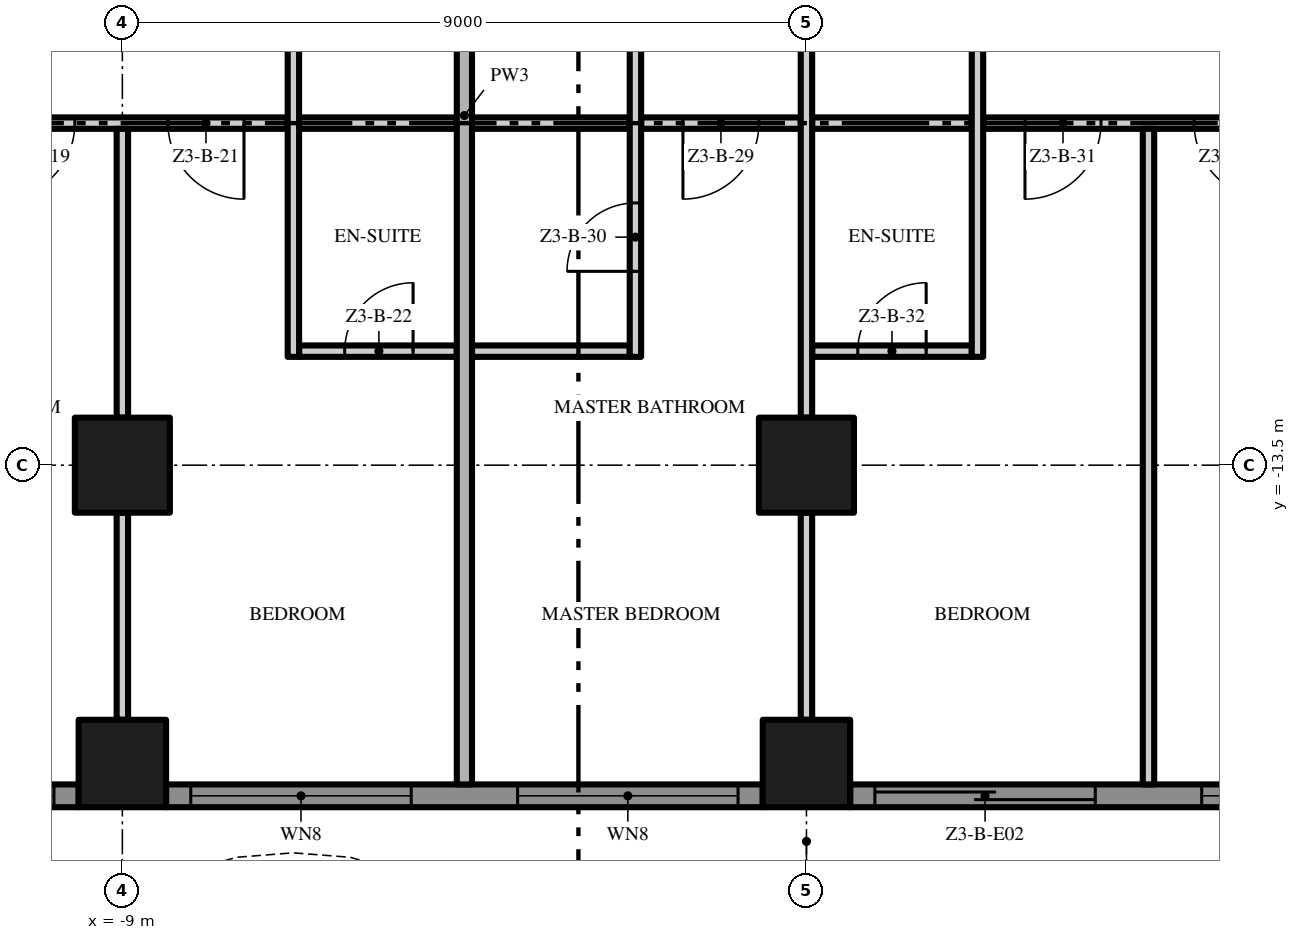
"""IFC4 building model, lengths in metres.
Left out: names, types, materials, properties, quantities, classifications, styles, units other than length and angle.
Written with IfcOpenShell. Run it as: python <this file> out.ifc"""

import sys

from ifc_helpers import new_model, si_unit, direction, frame, frame_2d, origin, origin_2d, place, context, subcontext, project, spatial, polyline, rectangle, outline, extrude, element, fill, save


model = new_model("IFC4")
c1 = context("Model", 3, precision=1e-05, world=origin(), true_north=direction((0.0, 1.0)))
c2 = subcontext(c1, "Body", "Model", "MODEL_VIEW")
j1 = project(units=[si_unit("LENGTHUNIT", "METRE"), si_unit("PLANEANGLEUNIT", "RADIAN")], contexts=[c1])
p1 = place(None, origin())
s1 = spatial("IfcSite", under=j1, at=p1, CompositionType="ELEMENT")
p2 = place(p1, origin())
s2 = spatial("IfcBuilding", under=s1, at=p2, CompositionType="ELEMENT")
p3 = place(p2, frame((0.0, 0.0, 144.0)))
s3 = spatial("IfcBuildingStorey", under=s2, at=p3, CompositionType="ELEMENT", Elevation=144.0)
p4 = place(p3, frame((-9.0, -13.5, 0.0), z_axis=(0.0, 0.0, 1.0), x_axis=(1.0, 0.0, 0.0)))
e1 = element("IfcColumn", 1, at=p4, inside=s3, PredefinedType="COLUMN", context=c2, shape_type="SweptSolid", body=[
    extrude(rectangle(XDim=1.25, YDim=1.25, at=origin_2d()), origin(), (0.0, 0.0, 1.0), 3.5),
])
p5 = place(p3, frame((-9.0, -17.425, 0.0), z_axis=(0.0, 0.0, 1.0), x_axis=(1.0, 0.0, 0.0)))
e2 = element("IfcColumn", 2, at=p5, inside=s3, PredefinedType="COLUMN", context=c2, shape_type="SweptSolid", body=[
    extrude(rectangle(XDim=1.15, YDim=1.15, at=origin_2d()), origin(), (0.0, 0.0, 1.0), 3.5),
])
p6 = place(p3, frame((0.0, -13.5, 0.0), z_axis=(0.0, 0.0, 1.0), x_axis=(1.0, 0.0, 0.0)))
e3 = element("IfcColumn", 3, at=p6, inside=s3, PredefinedType="COLUMN", context=c2, shape_type="SweptSolid", body=[
    extrude(rectangle(XDim=1.25, YDim=1.25, at=origin_2d()), origin(), (0.0, 0.0, 1.0), 3.5),
])
p7 = place(p3, frame((0.0, -17.425, 0.0), z_axis=(0.0, 0.0, 1.0), x_axis=(1.0, 0.0, 0.0)))
e4 = element("IfcColumn", 4, at=p7, inside=s3, PredefinedType="COLUMN", context=c2, shape_type="SweptSolid", body=[
    extrude(rectangle(XDim=1.15, YDim=1.15, at=origin_2d()), origin(), (0.0, 0.0, 1.0), 3.5),
])
p8 = place(p3, frame((-9.575, -17.85, 0.0), z_axis=(0.0, 0.0, 1.0), x_axis=(-1.0, 0.0, 0.0)))
e5 = element("IfcWall", 5, at=p8, inside=s3, PredefinedType="SOLIDWALL", context=c2, shape_type="SweptSolid", body=[
    extrude(rectangle(XDim=7.275, YDim=0.3, at=frame_2d((3.638, 0.0))), origin(), (0.0, 0.0, 1.0), 3.5),
])
p9 = place(p8, frame((4.625, 0.0, 0.0)))
e6 = element("IfcOpeningElement", 6, at=p9, cuts=e5, PredefinedType="OPENING", context=c2, shape_type="SweptSolid", body=[
    extrude(rectangle(XDim=2.35, YDim=2.4, at=frame_2d((1.175, 1.2))), frame((0.0, 0.16, 0.0), z_axis=(0.0, -1.0, 0.0), x_axis=(1.0, 0.0, 0.0)), (0.0, 0.0, 1.0), 0.32),
])
p10 = place(p8, frame((0.325, 0.0, 0.45)))
e7 = element("IfcOpeningElement", 7, at=p10, cuts=e5, PredefinedType="OPENING", context=c2, shape_type="SweptSolid", body=[
    extrude(rectangle(XDim=2.9, YDim=2.65, at=frame_2d((1.45, 1.325))), frame((0.0, 0.16, 0.0), z_axis=(0.0, -1.0, 0.0), x_axis=(1.0, 0.0, 0.0)), (0.0, 0.0, 1.0), 0.32),
])
p11 = place(p3, frame((-0.575, -17.85, 0.0), z_axis=(0.0, 0.0, 1.0), x_axis=(-1.0, 0.0, 0.0)))
e8 = element("IfcWall", 8, at=p11, inside=s3, PredefinedType="SOLIDWALL", context=c2, shape_type="SweptSolid", body=[
    extrude(rectangle(XDim=7.85, YDim=0.3, at=frame_2d((3.925, 0.0))), origin(), (0.0, 0.0, 1.0), 3.5),
])
p12 = place(p11, frame((4.625, 0.0, 0.45)))
e9 = element("IfcOpeningElement", 9, at=p12, cuts=e8, PredefinedType="OPENING", context=c2, shape_type="SweptSolid", body=[
    extrude(rectangle(XDim=2.9, YDim=2.65, at=frame_2d((1.45, 1.325))), frame((0.0, 0.16, 0.0), z_axis=(0.0, -1.0, 0.0), x_axis=(1.0, 0.0, 0.0)), (0.0, 0.0, 1.0), 0.32),
])
p13 = place(p11, frame((0.325, 0.0, 0.45)))
e10 = element("IfcOpeningElement", 10, at=p13, cuts=e8, PredefinedType="OPENING", context=c2, shape_type="SweptSolid", body=[
    extrude(rectangle(XDim=2.9, YDim=2.65, at=frame_2d((1.45, 1.325))), frame((0.0, 0.16, 0.0), z_axis=(0.0, -1.0, 0.0), x_axis=(1.0, 0.0, 0.0)), (0.0, 0.0, 1.0), 0.32),
])
p14 = place(p3, frame((8.425, -17.85, 0.0), z_axis=(0.0, 0.0, 1.0), x_axis=(-1.0, 0.0, 0.0)))
e11 = element("IfcWall", 11, at=p14, inside=s3, PredefinedType="SOLIDWALL", context=c2, shape_type="SweptSolid", body=[
    extrude(rectangle(XDim=7.85, YDim=0.3, at=frame_2d((3.925, 0.0))), origin(), (0.0, 0.0, 1.0), 3.5),
])
p15 = place(p14, frame((4.625, 0.0, 0.0)))
e12 = element("IfcOpeningElement", 12, at=p15, cuts=e11, PredefinedType="OPENING", context=c2, shape_type="SweptSolid", body=[
    extrude(rectangle(XDim=2.9, YDim=2.4, at=frame_2d((1.45, 1.2))), frame((0.0, 0.16, 0.0), z_axis=(0.0, -1.0, 0.0), x_axis=(1.0, 0.0, 0.0)), (0.0, 0.0, 1.0), 0.32),
])
p16 = place(p14, frame((0.325, 0.0, 0.45)))
e13 = element("IfcOpeningElement", 13, at=p16, cuts=e11, PredefinedType="OPENING", context=c2, shape_type="SweptSolid", body=[
    extrude(rectangle(XDim=2.9, YDim=2.65, at=frame_2d((1.45, 1.325))), frame((0.0, 0.16, 0.0), z_axis=(0.0, -1.0, 0.0), x_axis=(1.0, 0.0, 0.0)), (0.0, 0.0, 1.0), 0.32),
])
p17 = place(p3, origin())
e14 = element("IfcWall", 14, at=p17, inside=s3, PredefinedType="USERDEFINED", context=c2, shape_type="SweptSolid", body=[
    extrude(outline(polyline([(-18.0, -19.8), (-16.5, -20.505), (-15.0, -20.941), (-14.25, -21.0), (-13.5, -20.941), (-12.0, -20.505), (-10.5, -19.8), (-9.0, -19.095), (-7.5, -18.659), (-6.75, -18.6), (-6.0, -18.659), (-4.5, -19.095), (-3.0, -19.8), (-1.5, -20.505), (0.0, -20.941), (0.75, -21.0), (1.5, -20.941), (3.0, -20.505), (4.5, -19.8), (6.0, -19.095), (7.5, -18.659), (8.25, -18.6), (9.0, -18.659), (10.5, -19.095), (12.0, -19.8), (13.5, -20.505), (15.0, -20.941), (15.75, -21.0), (16.5, -20.941), (18.0, -20.505), (17.93, -20.265), (16.455, -20.694), (15.75, -20.749), (15.045, -20.694), (13.589, -20.271), (12.106, -19.574), (10.589, -18.86), (9.045, -18.411), (8.25, -18.349), (7.455, -18.411), (5.911, -18.86), (4.394, -19.574), (2.911, -20.271), (1.455, -20.694), (0.75, -20.749), (0.045, -20.694), (-1.411, -20.271), (-2.894, -19.574), (-4.411, -18.86), (-5.955, -18.411), (-6.75, -18.349), (-7.545, -18.411), (-9.089, -18.86), (-10.606, -19.574), (-12.089, -20.271), (-13.545, -20.694), (-14.25, -20.749), (-14.955, -20.694), (-16.411, -20.271), (-17.894, -19.574), (-18.0, -19.8)])), origin(), (0.0, 0.0, 1.0), 0.9),
])
p18 = place(p3, frame((-6.675, -12.0, 0.0), z_axis=(0.0, 0.0, 1.0), x_axis=(1.0, 0.0, 0.0)))
e15 = element("IfcWall", 15, at=p18, inside=s3, PredefinedType="PARTITIONING", context=c2, shape_type="SweptSolid", body=[
    extrude(rectangle(XDim=2.075, YDim=0.15, at=frame_2d((1.038, 0.0))), origin(), (0.0, 0.0, 1.0), 3.5),
])
p19 = place(p18, frame((0.6, 0.0, 0.0)))
e16 = element("IfcOpeningElement", 16, at=p19, cuts=e15, PredefinedType="OPENING", context=c2, shape_type="SweptSolid", body=[
    extrude(rectangle(XDim=0.9, YDim=2.1, at=frame_2d((0.45, 1.05))), frame((0.0, 0.085, 0.0), z_axis=(0.0, -1.0, 0.0), x_axis=(1.0, 0.0, 0.0)), (0.0, 0.0, 1.0), 0.17),
])
p20 = place(p3, frame((-4.4, -12.0, 0.0), z_axis=(0.0, 0.0, 1.0), x_axis=(1.0, 0.0, 0.0)))
e17 = element("IfcWall", 17, at=p20, inside=s3, PredefinedType="PARTITIONING", context=c2, shape_type="SweptSolid", body=[
    extrude(rectangle(XDim=2.075, YDim=0.15, at=frame_2d((1.038, 0.0))), origin(), (0.0, 0.0, 1.0), 3.5),
])
p21 = place(p3, frame((0.075, -12.0, 0.0), z_axis=(0.0, 0.0, 1.0), x_axis=(1.0, 0.0, 0.0)))
e18 = element("IfcWall", 18, at=p21, inside=s3, PredefinedType="PARTITIONING", context=c2, shape_type="SweptSolid", body=[
    extrude(rectangle(XDim=2.1, YDim=0.15, at=frame_2d((1.05, 0.0))), origin(), (0.0, 0.0, 1.0), 3.5),
])
p22 = place(p21, frame((0.6, 0.0, 0.0)))
e19 = element("IfcOpeningElement", 19, at=p22, cuts=e18, PredefinedType="OPENING", context=c2, shape_type="SweptSolid", body=[
    extrude(rectangle(XDim=0.9, YDim=2.1, at=frame_2d((0.45, 1.05))), frame((0.0, 0.085, 0.0), z_axis=(0.0, -1.0, 0.0), x_axis=(1.0, 0.0, 0.0)), (0.0, 0.0, 1.0), 0.17),
])
p23 = place(p3, frame((-6.825, -9.0, 0.0), z_axis=(0.0, 0.0, 1.0), x_axis=(-1.0, 0.0, 0.0)))
e20 = element("IfcWall", 20, at=p23, inside=s3, PredefinedType="PARTITIONING", context=c2, shape_type="SweptSolid", body=[
    extrude(rectangle(XDim=4.35, YDim=0.15, at=frame_2d((2.175, 0.0))), origin(), (0.0, 0.0, 1.0), 3.5),
])
p24 = place(p23, frame((2.8, 0.0, 0.0)))
e21 = element("IfcOpeningElement", 21, at=p24, cuts=e20, PredefinedType="OPENING", context=c2, shape_type="SweptSolid", body=[
    extrude(rectangle(XDim=1.0, YDim=2.4, at=frame_2d((0.5, 1.2))), frame((0.0, 0.085, 0.0), z_axis=(0.0, -1.0, 0.0), x_axis=(1.0, 0.0, 0.0)), (0.0, 0.0, 1.0), 0.17),
])
p25 = place(p23, frame((0.575, 0.0, 0.0)))
e22 = element("IfcOpeningElement", 22, at=p25, cuts=e20, PredefinedType="OPENING", context=c2, shape_type="SweptSolid", body=[
    extrude(rectangle(XDim=1.0, YDim=2.4, at=frame_2d((0.5, 1.2))), frame((0.0, 0.085, 0.0), z_axis=(0.0, -1.0, 0.0), x_axis=(1.0, 0.0, 0.0)), (0.0, 0.0, 1.0), 0.17),
])
for number, where, z_axis, x_axis in (
    (23, (-6.675, -9.0, 0.0), (0.0, 0.0, 1.0), (1.0, 0.0, 0.0)),
    (24, (-4.4, -9.0, 0.0), (0.0, 0.0, 1.0), (1.0, 0.0, 0.0)),
):
    element("IfcWall", number, at=place(p3, frame(where, z_axis=z_axis, x_axis=x_axis)), inside=s3, PredefinedType="PARTITIONING", context=c2, shape_type="SweptSolid", body=[
        extrude(rectangle(XDim=2.075, YDim=0.15, at=frame_2d((1.038, 0.0))), origin(), (0.0, 0.0, 1.0), 3.5),
    ])
p26 = place(p3, frame((-0.075, -9.0, 0.0), z_axis=(0.0, 0.0, 1.0), x_axis=(-1.0, 0.0, 0.0)))
e25 = element("IfcWall", 25, at=p26, inside=s3, PredefinedType="PARTITIONING", context=c2, shape_type="SweptSolid", body=[
    extrude(rectangle(XDim=2.1, YDim=0.15, at=frame_2d((1.05, 0.0))), origin(), (0.0, 0.0, 1.0), 3.5),
])
p27 = place(p26, frame((0.55, 0.0, 0.0)))
e26 = element("IfcOpeningElement", 26, at=p27, cuts=e25, PredefinedType="OPENING", context=c2, shape_type="SweptSolid", body=[
    extrude(rectangle(XDim=1.0, YDim=2.4, at=frame_2d((0.5, 1.2))), frame((0.0, 0.085, 0.0), z_axis=(0.0, -1.0, 0.0), x_axis=(1.0, 0.0, 0.0)), (0.0, 0.0, 1.0), 0.17),
])
p28 = place(p3, frame((0.075, -9.0, 0.0), z_axis=(0.0, 0.0, 1.0), x_axis=(1.0, 0.0, 0.0)))
e27 = element("IfcWall", 27, at=p28, inside=s3, PredefinedType="PARTITIONING", context=c2, shape_type="SweptSolid", body=[
    extrude(rectangle(XDim=2.1, YDim=0.15, at=frame_2d((1.05, 0.0))), origin(), (0.0, 0.0, 1.0), 3.5),
])
p29 = place(p3, frame((6.675, -9.0, 0.0), z_axis=(0.0, 0.0, 1.0), x_axis=(-1.0, 0.0, 0.0)))
e28 = element("IfcWall", 28, at=p29, inside=s3, PredefinedType="PARTITIONING", context=c2, shape_type="SweptSolid", body=[
    extrude(rectangle(XDim=4.35, YDim=0.15, at=frame_2d((2.175, 0.0))), origin(), (0.0, 0.0, 1.0), 3.5),
])
p30 = place(p29, frame((2.8, 0.0, 0.0)))
e29 = element("IfcOpeningElement", 29, at=p30, cuts=e28, PredefinedType="OPENING", context=c2, shape_type="SweptSolid", body=[
    extrude(rectangle(XDim=1.0, YDim=2.4, at=frame_2d((0.5, 1.2))), frame((0.0, 0.085, 0.0), z_axis=(0.0, -1.0, 0.0), x_axis=(1.0, 0.0, 0.0)), (0.0, 0.0, 1.0), 0.17),
])
p31 = place(p29, frame((0.575, 0.0, 0.0)))
e30 = element("IfcOpeningElement", 30, at=p31, cuts=e28, PredefinedType="OPENING", context=c2, shape_type="SweptSolid", body=[
    extrude(rectangle(XDim=1.0, YDim=2.4, at=frame_2d((0.5, 1.2))), frame((0.0, 0.085, 0.0), z_axis=(0.0, -1.0, 0.0), x_axis=(1.0, 0.0, 0.0)), (0.0, 0.0, 1.0), 0.17),
])
p32 = place(p3, frame((-9.0, -16.85, 0.0), z_axis=(0.0, 0.0, 1.0), x_axis=(0.0, 1.0, 0.0)))
e31 = element("IfcWall", 31, at=p32, inside=s3, PredefinedType="PARTITIONING", context=c2, shape_type="SweptSolid", body=[
    extrude(rectangle(XDim=2.725, YDim=0.15, at=frame_2d((1.363, 0.0))), origin(), (0.0, 0.0, 1.0), 3.5),
])
p33 = place(p3, frame((-9.0, -12.875, 0.0), z_axis=(0.0, 0.0, 1.0), x_axis=(0.0, 1.0, 0.0)))
e32 = element("IfcWall", 32, at=p33, inside=s3, PredefinedType="PARTITIONING", context=c2, shape_type="SweptSolid", body=[
    extrude(rectangle(XDim=3.8, YDim=0.15, at=frame_2d((1.9, 0.0))), origin(), (0.0, 0.0, 1.0), 3.5),
])
p34 = place(p3, frame((-6.75, -12.075, 0.0), z_axis=(0.0, 0.0, 1.0), x_axis=(0.0, 1.0, 0.0)))
e33 = element("IfcWall", 33, at=p34, inside=s3, PredefinedType="PARTITIONING", context=c2, shape_type="SweptSolid", body=[
    extrude(rectangle(XDim=7.65, YDim=0.15, at=frame_2d((3.825, 0.0))), origin(), (0.0, 0.0, 1.0), 3.5),
])
p35 = place(p3, frame((-4.5, -17.7, 0.0), z_axis=(0.0, 0.0, 1.0), x_axis=(0.0, 1.0, 0.0)))
e34 = element("IfcWall", 34, at=p35, inside=s3, PredefinedType="PARTITIONING", context=c2, shape_type="SweptSolid", body=[
    extrude(rectangle(XDim=17.6, YDim=0.2, at=frame_2d((8.8, 0.0))), origin(), (0.0, 0.0, 1.0), 3.5),
])
p36 = place(p3, frame((-2.25, -12.075, 0.0), z_axis=(0.0, 0.0, 1.0), x_axis=(0.0, 1.0, 0.0)))
e35 = element("IfcWall", 35, at=p36, inside=s3, PredefinedType="PARTITIONING", context=c2, shape_type="SweptSolid", body=[
    extrude(rectangle(XDim=7.65, YDim=0.15, at=frame_2d((3.825, 0.0))), origin(), (0.0, 0.0, 1.0), 3.5),
])
p37 = place(p36, frame((4.875, 0.0, 0.0)))
e36 = element("IfcOpeningElement", 36, at=p37, cuts=e35, PredefinedType="OPENING", context=c2, shape_type="SweptSolid", body=[
    extrude(rectangle(XDim=0.9, YDim=2.1, at=frame_2d((0.45, 1.05))), frame((0.0, 0.085, 0.0), z_axis=(0.0, -1.0, 0.0), x_axis=(1.0, 0.0, 0.0)), (0.0, 0.0, 1.0), 0.17),
])
p38 = place(p36, frame((1.125, 0.0, 0.0)))
e37 = element("IfcOpeningElement", 37, at=p38, cuts=e35, PredefinedType="OPENING", context=c2, shape_type="SweptSolid", body=[
    extrude(rectangle(XDim=0.9, YDim=2.1, at=frame_2d((0.45, 1.05))), frame((0.0, 0.085, 0.0), z_axis=(0.0, -1.0, 0.0), x_axis=(1.0, 0.0, 0.0)), (0.0, 0.0, 1.0), 0.17),
])
p39 = place(p3, frame((0.0, -16.85, 0.0), z_axis=(0.0, 0.0, 1.0), x_axis=(0.0, 1.0, 0.0)))
e38 = element("IfcWall", 38, at=p39, inside=s3, PredefinedType="PARTITIONING", context=c2, shape_type="SweptSolid", body=[
    extrude(rectangle(XDim=2.725, YDim=0.15, at=frame_2d((1.363, 0.0))), origin(), (0.0, 0.0, 1.0), 3.5),
])
p40 = place(p3, frame((0.0, -12.875, 0.0), z_axis=(0.0, 0.0, 1.0), x_axis=(0.0, 1.0, 0.0)))
e39 = element("IfcWall", 39, at=p40, inside=s3, PredefinedType="PARTITIONING", context=c2, shape_type="SweptSolid", body=[
    extrude(rectangle(XDim=7.75, YDim=0.15, at=frame_2d((3.875, 0.0))), origin(), (0.0, 0.0, 1.0), 3.5),
])
p41 = place(p3, frame((2.25, -12.075, 0.0), z_axis=(0.0, 0.0, 1.0), x_axis=(0.0, 1.0, 0.0)))
e40 = element("IfcWall", 40, at=p41, inside=s3, PredefinedType="PARTITIONING", context=c2, shape_type="SweptSolid", body=[
    extrude(rectangle(XDim=7.65, YDim=0.15, at=frame_2d((3.825, 0.0))), origin(), (0.0, 0.0, 1.0), 3.5),
])
p42 = place(p3, frame((4.5, -17.7, 0.0), z_axis=(0.0, 0.0, 1.0), x_axis=(0.0, 1.0, 0.0)))
e41 = element("IfcWall", 41, at=p42, inside=s3, PredefinedType="PARTITIONING", context=c2, shape_type="SweptSolid", body=[
    extrude(rectangle(XDim=8.625, YDim=0.15, at=frame_2d((4.312, 0.0))), origin(), (0.0, 0.0, 1.0), 3.5),
])
p43 = place(p10, origin())
e42 = element("IfcWindow", 42, at=p43, inside=s3, PartitioningType="SINGLE_PANEL", PredefinedType="WINDOW", context=c2, shape_type="SweptSolid", body=[
    extrude(rectangle(XDim=2.9, YDim=2.65, at=frame_2d((1.45, 1.325))), frame((0.0, 0.03, 0.0), z_axis=(0.0, -1.0, 0.0), x_axis=(1.0, 0.0, 0.0)), (0.0, 0.0, 1.0), 0.06),
])
fill(e7, e42)
p44 = place(p12, origin())
e43 = element("IfcWindow", 43, at=p44, inside=s3, PartitioningType="SINGLE_PANEL", PredefinedType="WINDOW", context=c2, shape_type="SweptSolid", body=[
    extrude(rectangle(XDim=2.9, YDim=2.65, at=frame_2d((1.45, 1.325))), frame((0.0, 0.03, 0.0), z_axis=(0.0, -1.0, 0.0), x_axis=(1.0, 0.0, 0.0)), (0.0, 0.0, 1.0), 0.06),
])
fill(e9, e43)
p45 = place(p13, origin())
e44 = element("IfcWindow", 44, at=p45, inside=s3, PartitioningType="SINGLE_PANEL", PredefinedType="WINDOW", context=c2, shape_type="SweptSolid", body=[
    extrude(rectangle(XDim=2.9, YDim=2.65, at=frame_2d((1.45, 1.325))), frame((0.0, 0.03, 0.0), z_axis=(0.0, -1.0, 0.0), x_axis=(1.0, 0.0, 0.0)), (0.0, 0.0, 1.0), 0.06),
])
fill(e10, e44)
p46 = place(p15, origin())
e45 = element("IfcDoor", 45, at=p46, inside=s3, OperationType="SINGLE_SWING_LEFT", PredefinedType="DOOR", context=c2, shape_type="SweptSolid", body=[
    extrude(rectangle(XDim=2.9, YDim=2.4, at=frame_2d((1.45, 1.2))), frame((0.0, 0.025, 0.0), z_axis=(0.0, -1.0, 0.0), x_axis=(1.0, 0.0, 0.0)), (0.0, 0.0, 1.0), 0.05),
])
fill(e12, e45)
p47 = place(p16, origin())
e46 = element("IfcWindow", 46, at=p47, inside=s3, PartitioningType="SINGLE_PANEL", PredefinedType="WINDOW", context=c2, shape_type="SweptSolid", body=[
    extrude(rectangle(XDim=2.9, YDim=2.65, at=frame_2d((1.45, 1.325))), frame((0.0, 0.03, 0.0), z_axis=(0.0, -1.0, 0.0), x_axis=(1.0, 0.0, 0.0)), (0.0, 0.0, 1.0), 0.06),
])
fill(e13, e46)
p48 = place(p24, origin())
e47 = element("IfcDoor", 47, at=p48, inside=s3, OperationType="SINGLE_SWING_RIGHT", PredefinedType="DOOR", context=c2, shape_type="SweptSolid", body=[
    extrude(rectangle(XDim=1.0, YDim=2.4, at=frame_2d((0.5, 1.2))), frame((0.0, 0.025, 0.0), z_axis=(0.0, -1.0, 0.0), x_axis=(1.0, 0.0, 0.0)), (0.0, 0.0, 1.0), 0.05),
])
fill(e21, e47)
p49 = place(p25, origin())
e48 = element("IfcDoor", 48, at=p49, inside=s3, OperationType="SINGLE_SWING_LEFT", PredefinedType="DOOR", context=c2, shape_type="SweptSolid", body=[
    extrude(rectangle(XDim=1.0, YDim=2.4, at=frame_2d((0.5, 1.2))), frame((0.0, 0.025, 0.0), z_axis=(0.0, -1.0, 0.0), x_axis=(1.0, 0.0, 0.0)), (0.0, 0.0, 1.0), 0.05),
])
fill(e22, e48)
p50 = place(p19, origin())
e49 = element("IfcDoor", 49, at=p50, inside=s3, OperationType="SINGLE_SWING_RIGHT", PredefinedType="DOOR", context=c2, shape_type="SweptSolid", body=[
    extrude(rectangle(XDim=0.9, YDim=2.1, at=frame_2d((0.45, 1.05))), frame((0.0, 0.025, 0.0), z_axis=(0.0, -1.0, 0.0), x_axis=(1.0, 0.0, 0.0)), (0.0, 0.0, 1.0), 0.05),
])
fill(e16, e49)
p51 = place(p27, origin())
e50 = element("IfcDoor", 50, at=p51, inside=s3, OperationType="SINGLE_SWING_RIGHT", PredefinedType="DOOR", context=c2, shape_type="SweptSolid", body=[
    extrude(rectangle(XDim=1.0, YDim=2.4, at=frame_2d((0.5, 1.2))), frame((0.0, 0.025, 0.0), z_axis=(0.0, -1.0, 0.0), x_axis=(1.0, 0.0, 0.0)), (0.0, 0.0, 1.0), 0.05),
])
fill(e26, e50)
p52 = place(p38, origin())
e51 = element("IfcDoor", 51, at=p52, inside=s3, OperationType="SINGLE_SWING_LEFT", PredefinedType="DOOR", context=c2, shape_type="SweptSolid", body=[
    extrude(rectangle(XDim=0.9, YDim=2.1, at=frame_2d((0.45, 1.05))), frame((0.0, 0.025, 0.0), z_axis=(0.0, -1.0, 0.0), x_axis=(1.0, 0.0, 0.0)), (0.0, 0.0, 1.0), 0.05),
])
fill(e37, e51)
p53 = place(p30, origin())
e52 = element("IfcDoor", 52, at=p53, inside=s3, OperationType="SINGLE_SWING_RIGHT", PredefinedType="DOOR", context=c2, shape_type="SweptSolid", body=[
    extrude(rectangle(XDim=1.0, YDim=2.4, at=frame_2d((0.5, 1.2))), frame((0.0, 0.025, 0.0), z_axis=(0.0, -1.0, 0.0), x_axis=(1.0, 0.0, 0.0)), (0.0, 0.0, 1.0), 0.05),
])
fill(e29, e52)
p54 = place(p22, origin())
e53 = element("IfcDoor", 53, at=p54, inside=s3, OperationType="SINGLE_SWING_RIGHT", PredefinedType="DOOR", context=c2, shape_type="SweptSolid", body=[
    extrude(rectangle(XDim=0.9, YDim=2.1, at=frame_2d((0.45, 1.05))), frame((0.0, 0.025, 0.0), z_axis=(0.0, -1.0, 0.0), x_axis=(1.0, 0.0, 0.0)), (0.0, 0.0, 1.0), 0.05),
])
fill(e19, e53)
p55 = place(p31, origin())
e54 = element("IfcDoor", 54, at=p55, inside=s3, OperationType="SINGLE_SWING_LEFT", PredefinedType="DOOR", context=c2, shape_type="SweptSolid", body=[
    extrude(rectangle(XDim=1.0, YDim=2.4, at=frame_2d((0.5, 1.2))), frame((0.0, 0.025, 0.0), z_axis=(0.0, -1.0, 0.0), x_axis=(1.0, 0.0, 0.0)), (0.0, 0.0, 1.0), 0.05),
])
fill(e30, e54)
save(model, sys.argv[1])
